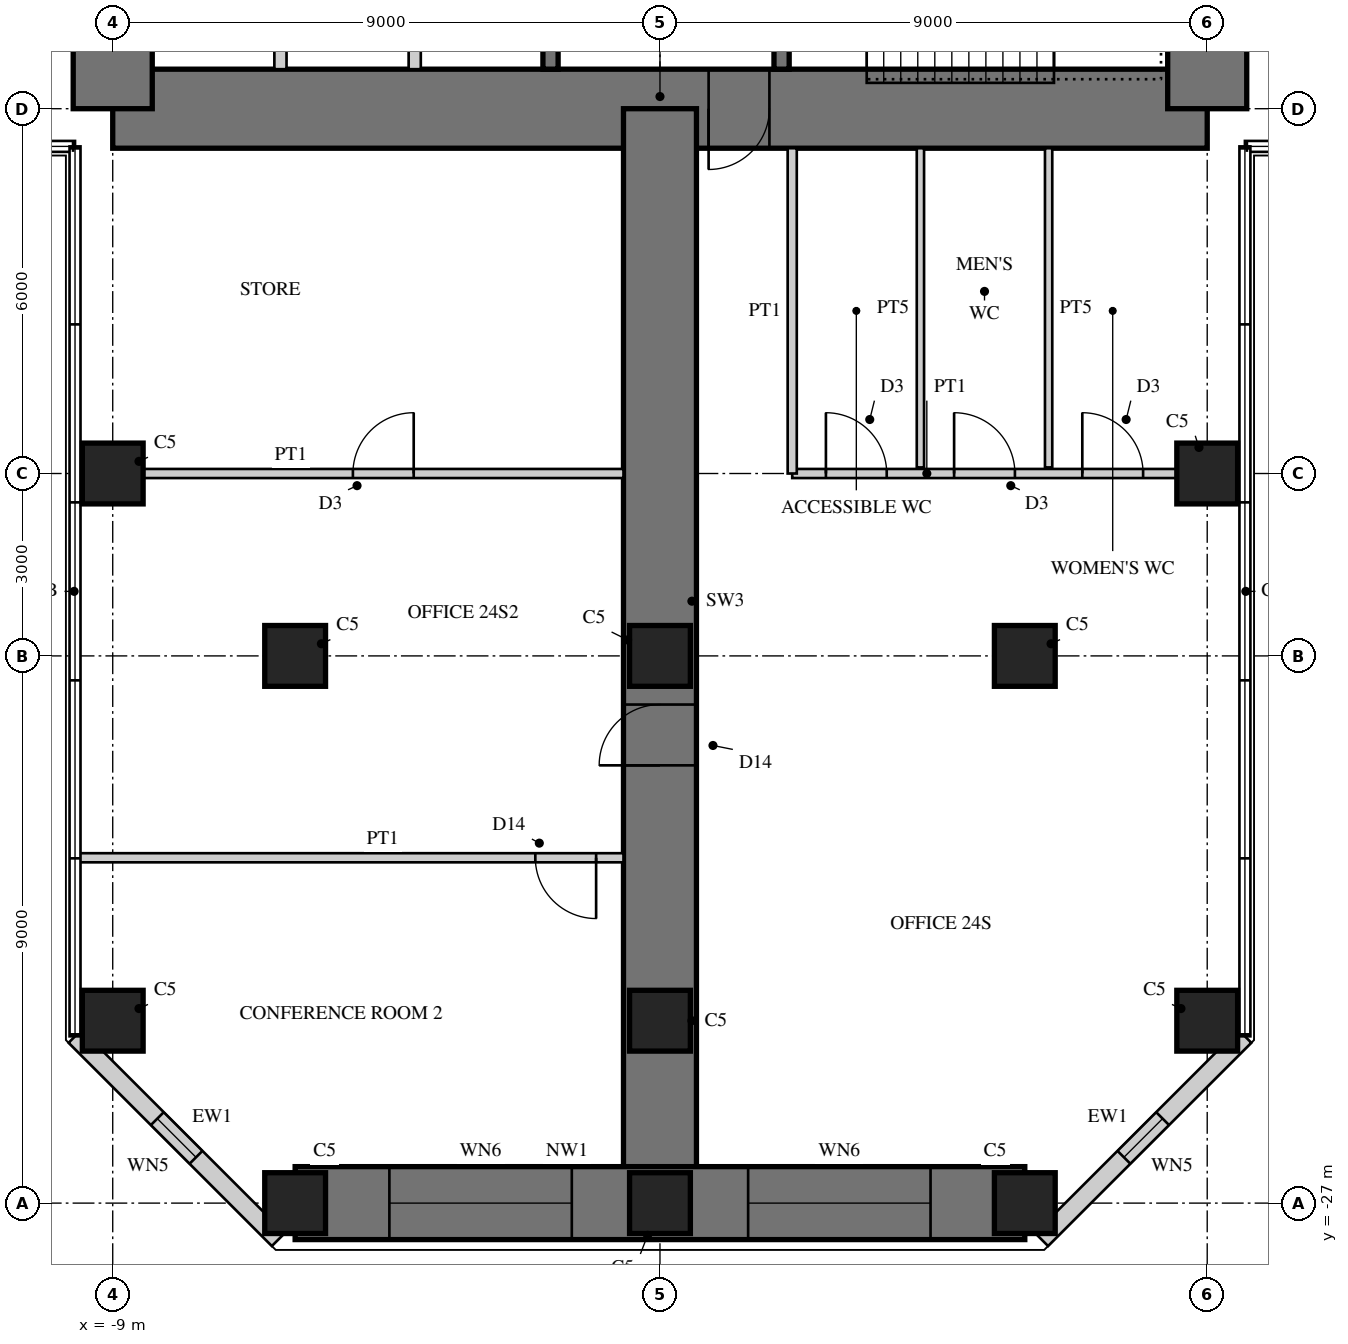
"""IFC4 building model, lengths in metres.
Left out: names, types, materials, properties, quantities, classifications, styles, units other than length and angle.
Written with IfcOpenShell. Run it as: python <this file> out.ifc"""

import sys

from ifc_helpers import new_model, si_unit, direction, frame, frame_2d, origin, origin_2d, place, context, subcontext, project, spatial, rectangle, hollow_rectangle, extrude, element, fill, save


model = new_model("IFC4")
c1 = context("Model", 3, precision=1e-05, world=origin(), true_north=direction((0.0, 1.0)))
c2 = subcontext(c1, "Body", "Model", "MODEL_VIEW")
j1 = project(units=[si_unit("LENGTHUNIT", "METRE"), si_unit("PLANEANGLEUNIT", "RADIAN")], contexts=[c1])
p1 = place(None, origin())
s1 = spatial("IfcSite", under=j1, at=p1, CompositionType="ELEMENT")
p2 = place(p1, origin())
s2 = spatial("IfcBuilding", under=s1, at=p2, CompositionType="ELEMENT")
p3 = place(p2, frame((0.0, 0.0, 100.5)))
s3 = spatial("IfcBuildingStorey", under=s2, at=p3, CompositionType="ELEMENT", Elevation=100.5)
p4 = place(p3, frame((-9.0, -9.0, 0.0), z_axis=(0.0, 0.0, 1.0), x_axis=(1.0, 0.0, 0.0)))
e1 = element("IfcWall", 1, at=p4, inside=s3, PredefinedType="SHEAR", context=c2, shape_type="SweptSolid", body=[
    extrude(rectangle(XDim=18.0, YDim=1.3, at=frame_2d((9.0, 0.0))), origin(), (0.0, 0.0, 1.0), 4.0),
])
p5 = place(p4, frame((9.8, 0.0, 0.0)))
e2 = element("IfcOpeningElement", 2, at=p5, cuts=e1, PredefinedType="OPENING", context=c2, shape_type="SweptSolid", body=[
    extrude(rectangle(XDim=1.0, YDim=2.4, at=frame_2d((0.5, 1.2))), frame((0.0, 0.66, 0.0), z_axis=(0.0, -1.0, 0.0), x_axis=(1.0, 0.0, 0.0)), (0.0, 0.0, 1.0), 1.32),
])
p6 = place(p3, frame((9.0, -9.0, 0.0), z_axis=(0.0, 0.0, 1.0), x_axis=(0.0, 1.0, 0.0)))
e3 = element("IfcWall", 3, at=p6, inside=s3, PredefinedType="SHEAR", context=c2, shape_type="SweptSolid", body=[
    extrude(rectangle(XDim=18.0, YDim=1.3, at=frame_2d((9.0, 0.0))), origin(), (0.0, 0.0, 1.0), 4.0),
])
p7 = place(p6, frame((9.8, 0.0, 0.0)))
e4 = element("IfcOpeningElement", 4, at=p7, cuts=e3, PredefinedType="OPENING", context=c2, shape_type="SweptSolid", body=[
    extrude(rectangle(XDim=1.0, YDim=2.4, at=frame_2d((0.5, 1.2))), frame((0.0, 0.66, 0.0), z_axis=(0.0, -1.0, 0.0), x_axis=(1.0, 0.0, 0.0)), (0.0, 0.0, 1.0), 1.32),
])
p8 = place(p3, frame((-9.0, 9.0, 0.0), z_axis=(0.0, 0.0, 1.0), x_axis=(0.0, -1.0, 0.0)))
e5 = element("IfcWall", 5, at=p8, inside=s3, PredefinedType="SHEAR", context=c2, shape_type="SweptSolid", body=[
    extrude(rectangle(XDim=18.0, YDim=1.3, at=frame_2d((9.0, 0.0))), origin(), (0.0, 0.0, 1.0), 4.0),
])
p9 = place(p8, frame((9.8, 0.0, 0.0)))
e6 = element("IfcOpeningElement", 6, at=p9, cuts=e5, PredefinedType="OPENING", context=c2, shape_type="SweptSolid", body=[
    extrude(rectangle(XDim=1.0, YDim=2.4, at=frame_2d((0.5, 1.2))), frame((0.0, 0.66, 0.0), z_axis=(0.0, -1.0, 0.0), x_axis=(1.0, 0.0, 0.0)), (0.0, 0.0, 1.0), 1.32),
])
p10 = place(p3, frame((-1.8, -1.875, 0.0), z_axis=(0.0, 0.0, 1.0), x_axis=(0.0, -1.0, 0.0)))
e7 = element("IfcWall", 7, at=p10, inside=s3, PredefinedType="SHEAR", context=c2, shape_type="SweptSolid", body=[
    extrude(rectangle(XDim=6.475, YDim=0.25, at=frame_2d((3.238, 0.0))), origin(), (0.0, 0.0, 1.0), 4.0),
])
p11 = place(p10, frame((1.875, 0.0, 0.0)))
e8 = element("IfcOpeningElement", 8, at=p11, cuts=e7, PredefinedType="OPENING", context=c2, shape_type="SweptSolid", body=[
    extrude(rectangle(XDim=1.6, YDim=2.4, at=frame_2d((0.8, 1.2))), frame((0.0, 0.135, 0.0), z_axis=(0.0, -1.0, 0.0), x_axis=(1.0, 0.0, 0.0)), (0.0, 0.0, 1.0), 0.27),
])
for number, where, z_axis, x_axis in (
    (9, (-4.033, -5.975, 0.0), (0.0, 0.0, 1.0), (0.0, -1.0, 0.0)),
    (10, (-6.242, -5.975, 0.0), (0.0, 0.0, 1.0), (0.0, -1.0, 0.0)),
):
    element("IfcWall", number, at=place(p3, frame(where, z_axis=z_axis, x_axis=x_axis)), inside=s3, PredefinedType="PARTITIONING", context=c2, shape_type="SweptSolid", body=[
        extrude(rectangle(XDim=2.375, YDim=0.2, at=frame_2d((1.188, 0.0))), origin(), (0.0, 0.0, 1.0), 4.0),
    ])
p12 = place(p3, frame((2.0, -1.675, 0.0), z_axis=(0.0, 0.0, 1.0), x_axis=(0.0, -1.0, 0.0)))
e11 = element("IfcWall", 11, at=p12, inside=s3, PredefinedType="SHEAR", context=c2, shape_type="SweptSolid", body=[
    extrude(rectangle(XDim=6.675, YDim=0.25, at=frame_2d((3.337, 0.0))), origin(), (0.0, 0.0, 1.0), 4.0),
])
p13 = place(p12, frame((0.725, 0.0, 0.0)))
e12 = element("IfcOpeningElement", 12, at=p13, cuts=e11, PredefinedType="OPENING", context=c2, shape_type="SweptSolid", body=[
    extrude(rectangle(XDim=1.0, YDim=2.1, at=frame_2d((0.5, 1.05))), frame((0.0, 0.135, 0.0), z_axis=(0.0, -1.0, 0.0), x_axis=(1.0, 0.0, 0.0)), (0.0, 0.0, 1.0), 0.27),
])
p14 = place(p3, frame((0.0, -9.0, 0.0), z_axis=(0.0, 0.0, 1.0), x_axis=(0.0, -1.0, 0.0)))
e13 = element("IfcWall", 13, at=p14, inside=s3, PredefinedType="SHEAR", context=c2, shape_type="SweptSolid", body=[
    extrude(rectangle(XDim=18.0, YDim=1.2, at=frame_2d((9.0, 0.0))), origin(), (0.0, 0.0, 1.0), 4.0),
])
p15 = place(p14, frame((9.8, 0.0, 0.0)))
e14 = element("IfcOpeningElement", 14, at=p15, cuts=e13, PredefinedType="OPENING", context=c2, shape_type="SweptSolid", body=[
    extrude(rectangle(XDim=1.0, YDim=2.2, at=frame_2d((0.5, 1.1))), frame((0.0, 0.61, 0.0), z_axis=(0.0, -1.0, 0.0), x_axis=(1.0, 0.0, 0.0)), (0.0, 0.0, 1.0), 1.22),
])
p16 = place(p3, frame((-6.0, -27.0, 0.0), z_axis=(0.0, 0.0, 1.0), x_axis=(1.0, 0.0, 0.0)))
e15 = element("IfcWall", 15, at=p16, inside=s3, PredefinedType="SHEAR", context=c2, shape_type="SweptSolid", body=[
    extrude(rectangle(XDim=12.0, YDim=1.2, at=frame_2d((6.0, 0.0))), origin(), (0.0, 0.0, 1.0), 4.0),
])
p17 = place(p16, frame((1.55, 0.0, 0.6)))
e16 = element("IfcOpeningElement", 16, at=p17, cuts=e15, PredefinedType="OPENING", context=c2, shape_type="SweptSolid", body=[
    extrude(rectangle(XDim=3.0, YDim=2.4, at=frame_2d((1.5, 1.2))), frame((0.0, 0.61, 0.0), z_axis=(0.0, -1.0, 0.0), x_axis=(1.0, 0.0, 0.0)), (0.0, 0.0, 1.0), 1.22),
])
p18 = place(p16, frame((7.45, 0.0, 0.6)))
e17 = element("IfcOpeningElement", 17, at=p18, cuts=e15, PredefinedType="OPENING", context=c2, shape_type="SweptSolid", body=[
    extrude(rectangle(XDim=3.0, YDim=2.4, at=frame_2d((1.5, 1.2))), frame((0.0, 0.61, 0.0), z_axis=(0.0, -1.0, 0.0), x_axis=(1.0, 0.0, 0.0)), (0.0, 0.0, 1.0), 1.22),
])
for number, where, z_axis, x_axis in (
    (18, (-9.0, -15.0, 0.0), (0.0, 0.0, 1.0), (1.0, 0.0, 0.0)),
    (19, (-9.0, -24.0, 0.0), (0.0, 0.0, 1.0), (1.0, 0.0, 0.0)),
    (20, (9.0, -15.0, 0.0), (0.0, 0.0, 1.0), (1.0, 0.0, 0.0)),
    (21, (9.0, -24.0, 0.0), (0.0, 0.0, 1.0), (1.0, 0.0, 0.0)),
    (22, (-6.0, -27.0, 0.0), (0.0, 0.0, 1.0), (1.0, 0.0, 0.0)),
    (23, (0.0, -27.0, 0.0), (0.0, 0.0, 1.0), (1.0, 0.0, 0.0)),
    (24, (6.0, -27.0, 0.0), (0.0, 0.0, 1.0), (1.0, 0.0, 0.0)),
    (25, (-6.0, -18.0, 0.0), (0.0, 0.0, 1.0), (1.0, 0.0, 0.0)),
    (26, (0.0, -18.0, 0.0), (0.0, 0.0, 1.0), (1.0, 0.0, 0.0)),
    (27, (6.0, -18.0, 0.0), (0.0, 0.0, 1.0), (1.0, 0.0, 0.0)),
    (28, (0.0, -24.0, 0.0), (0.0, 0.0, 1.0), (1.0, 0.0, 0.0)),
):
    element("IfcColumn", number, at=place(p3, frame(where, z_axis=z_axis, x_axis=x_axis)), inside=s3, PredefinedType="COLUMN", context=c2, shape_type="SweptSolid", body=[
        extrude(rectangle(XDim=1.0, YDim=1.0, at=origin_2d()), origin(), (0.0, 0.0, 1.0), 4.0),
    ])
p19 = place(p3, frame((-9.62, -24.257, 0.0), z_axis=(0.0, 0.0, 1.0), x_axis=(0.707106781187, -0.707106781187, 0.0)))
e29 = element("IfcWall", 29, at=p19, inside=s3, PredefinedType="SOLIDWALL", context=c2, shape_type="SweptSolid", body=[
    extrude(rectangle(XDim=4.728, YDim=0.3, at=frame_2d((2.364, 0.0))), origin(), (0.0, 0.0, 1.0), 3.8),
])
p20 = place(p19, frame((1.914, 0.0, 0.3)))
e30 = element("IfcOpeningElement", 30, at=p20, cuts=e29, PredefinedType="OPENING", context=c2, shape_type="SweptSolid", body=[
    extrude(rectangle(XDim=0.9, YDim=2.4, at=frame_2d((0.45, 1.2))), frame((0.0, 0.16, 0.0), z_axis=(0.0, -1.0, 0.0), x_axis=(1.0, 0.0, 0.0)), (0.0, 0.0, 1.0), 0.32),
])
p21 = place(p3, frame((6.277, -27.6, 0.0), z_axis=(0.0, 0.0, 1.0), x_axis=(0.707106781187, 0.707106781187, 0.0)))
e31 = element("IfcWall", 31, at=p21, inside=s3, PredefinedType="SOLIDWALL", context=c2, shape_type="SweptSolid", body=[
    extrude(rectangle(XDim=4.728, YDim=0.3, at=frame_2d((2.364, 0.0))), origin(), (0.0, 0.0, 1.0), 3.8),
])
p22 = place(p21, frame((1.914, 0.0, 0.3)))
e32 = element("IfcOpeningElement", 32, at=p22, cuts=e31, PredefinedType="OPENING", context=c2, shape_type="SweptSolid", body=[
    extrude(rectangle(XDim=0.9, YDim=2.4, at=frame_2d((0.45, 1.2))), frame((0.0, 0.16, 0.0), z_axis=(0.0, -1.0, 0.0), x_axis=(1.0, 0.0, 0.0)), (0.0, 0.0, 1.0), 0.32),
])
p23 = place(p3, frame((2.175, -15.0, 0.0), z_axis=(0.0, 0.0, 1.0), x_axis=(1.0, 0.0, 0.0)))
e33 = element("IfcWall", 33, at=p23, inside=s3, PredefinedType="PARTITIONING", context=c2, shape_type="SweptSolid", body=[
    extrude(rectangle(XDim=6.325, YDim=0.15, at=frame_2d((3.163, 0.0))), origin(), (0.0, 0.0, 1.0), 3.0),
])
p24 = place(p23, frame((0.554, 0.0, 0.0)))
e34 = element("IfcOpeningElement", 34, at=p24, cuts=e33, PredefinedType="OPENING", context=c2, shape_type="SweptSolid", body=[
    extrude(rectangle(XDim=1.0, YDim=2.1, at=frame_2d((0.5, 1.05))), frame((0.0, 0.085, 0.0), z_axis=(0.0, -1.0, 0.0), x_axis=(1.0, 0.0, 0.0)), (0.0, 0.0, 1.0), 0.17),
])
p25 = place(p23, frame((2.663, 0.0, 0.0)))
e35 = element("IfcOpeningElement", 35, at=p25, cuts=e33, PredefinedType="OPENING", context=c2, shape_type="SweptSolid", body=[
    extrude(rectangle(XDim=1.0, YDim=2.1, at=frame_2d((0.5, 1.05))), frame((0.0, 0.085, 0.0), z_axis=(0.0, -1.0, 0.0), x_axis=(1.0, 0.0, 0.0)), (0.0, 0.0, 1.0), 0.17),
])
p26 = place(p23, frame((4.771, 0.0, 0.0)))
e36 = element("IfcOpeningElement", 36, at=p26, cuts=e33, PredefinedType="OPENING", context=c2, shape_type="SweptSolid", body=[
    extrude(rectangle(XDim=1.0, YDim=2.1, at=frame_2d((0.5, 1.05))), frame((0.0, 0.085, 0.0), z_axis=(0.0, -1.0, 0.0), x_axis=(1.0, 0.0, 0.0)), (0.0, 0.0, 1.0), 0.17),
])
p27 = place(p3, frame((2.175, -9.65, 0.0), z_axis=(0.0, 0.0, 1.0), x_axis=(0.0, -1.0, 0.0)))
e37 = element("IfcWall", 37, at=p27, inside=s3, PredefinedType="PARTITIONING", context=c2, shape_type="SweptSolid", body=[
    extrude(rectangle(XDim=5.35, YDim=0.15, at=frame_2d((2.675, 0.0))), origin(), (0.0, 0.0, 1.0), 3.8),
])
for number, where, z_axis, x_axis in (
    (38, (4.283, -9.65, 0.0), (0.0, 0.0, 1.0), (0.0, -1.0, 0.0)),
    (39, (6.392, -9.65, 0.0), (0.0, 0.0, 1.0), (0.0, -1.0, 0.0)),
):
    element("IfcWall", number, at=place(p3, frame(where, z_axis=z_axis, x_axis=x_axis)), inside=s3, PredefinedType="PLUMBINGWALL", context=c2, shape_type="SweptSolid", body=[
        extrude(rectangle(XDim=5.25, YDim=0.12, at=frame_2d((2.625, 0.0))), origin(), (0.0, 0.0, 1.0), 3.8),
    ])
p28 = place(p3, frame((-8.5, -15.0, 0.0), z_axis=(0.0, 0.0, 1.0), x_axis=(1.0, 0.0, 0.0)))
e40 = element("IfcWall", 40, at=p28, inside=s3, PredefinedType="PARTITIONING", context=c2, shape_type="SweptSolid", body=[
    extrude(rectangle(XDim=7.9, YDim=0.15, at=frame_2d((3.95, 0.0))), origin(), (0.0, 0.0, 1.0), 3.0),
])
p29 = place(p28, frame((3.45, 0.0, 0.0)))
e41 = element("IfcOpeningElement", 41, at=p29, cuts=e40, PredefinedType="OPENING", context=c2, shape_type="SweptSolid", body=[
    extrude(rectangle(XDim=1.0, YDim=2.1, at=frame_2d((0.5, 1.05))), frame((0.0, 0.085, 0.0), z_axis=(0.0, -1.0, 0.0), x_axis=(1.0, 0.0, 0.0)), (0.0, 0.0, 1.0), 0.17),
])
p30 = place(p3, frame((-9.58, -21.32, 0.0), z_axis=(0.0, 0.0, 1.0), x_axis=(1.0, 0.0, 0.0)))
e42 = element("IfcWall", 42, at=p30, inside=s3, PredefinedType="PARTITIONING", context=c2, shape_type="SweptSolid", body=[
    extrude(rectangle(XDim=8.98, YDim=0.15, at=frame_2d((4.49, 0.0))), origin(), (0.0, 0.0, 1.0), 3.8),
])
p31 = place(p30, frame((7.53, 0.0, 0.0)))
e43 = element("IfcOpeningElement", 43, at=p31, cuts=e42, PredefinedType="OPENING", context=c2, shape_type="SweptSolid", body=[
    extrude(rectangle(XDim=1.0, YDim=2.2, at=frame_2d((0.5, 1.1))), frame((0.0, 0.085, 0.0), z_axis=(0.0, -1.0, 0.0), x_axis=(1.0, 0.0, 0.0)), (0.0, 0.0, 1.0), 0.17),
])
p32 = place(p20, origin())
e44 = element("IfcWindow", 44, at=p32, inside=s3, PartitioningType="SINGLE_PANEL", PredefinedType="WINDOW", context=c2, shape_type="SweptSolid", body=[
    extrude(hollow_rectangle(XDim=0.9, YDim=2.4, WallThickness=0.06, at=frame_2d((0.45, 1.2))), frame((0.0, 0.03, 0.0), z_axis=(0.0, -1.0, 0.0), x_axis=(1.0, 0.0, 0.0)), (0.0, 0.0, 1.0), 0.06),
    extrude(rectangle(XDim=0.779, YDim=2.279, at=frame_2d((0.45, 1.2))), frame((0.0, 0.03, 0.0), z_axis=(0.0, -1.0, 0.0), x_axis=(1.0, 0.0, 0.0)), (0.0, 0.0, 1.0), 0.06),
])
fill(e30, e44)
p33 = place(p17, origin())
e45 = element("IfcWindow", 45, at=p33, inside=s3, PartitioningType="SINGLE_PANEL", PredefinedType="WINDOW", context=c2, shape_type="SweptSolid", body=[
    extrude(hollow_rectangle(XDim=3.0, YDim=2.4, WallThickness=0.06, at=frame_2d((1.5, 1.2))), frame((0.0, 0.03, 0.0), z_axis=(0.0, -1.0, 0.0), x_axis=(1.0, 0.0, 0.0)), (0.0, 0.0, 1.0), 0.06),
    extrude(rectangle(XDim=2.879, YDim=2.279, at=frame_2d((1.5, 1.2))), frame((0.0, 0.03, 0.0), z_axis=(0.0, -1.0, 0.0), x_axis=(1.0, 0.0, 0.0)), (0.0, 0.0, 1.0), 0.06),
])
fill(e16, e45)
p34 = place(p18, origin())
e46 = element("IfcWindow", 46, at=p34, inside=s3, PartitioningType="SINGLE_PANEL", PredefinedType="WINDOW", context=c2, shape_type="SweptSolid", body=[
    extrude(hollow_rectangle(XDim=3.0, YDim=2.4, WallThickness=0.06, at=frame_2d((1.5, 1.2))), frame((0.0, 0.03, 0.0), z_axis=(0.0, -1.0, 0.0), x_axis=(1.0, 0.0, 0.0)), (0.0, 0.0, 1.0), 0.06),
    extrude(rectangle(XDim=2.879, YDim=2.279, at=frame_2d((1.5, 1.2))), frame((0.0, 0.03, 0.0), z_axis=(0.0, -1.0, 0.0), x_axis=(1.0, 0.0, 0.0)), (0.0, 0.0, 1.0), 0.06),
])
fill(e17, e46)
p35 = place(p22, origin())
e47 = element("IfcWindow", 47, at=p35, inside=s3, PartitioningType="SINGLE_PANEL", PredefinedType="WINDOW", context=c2, shape_type="SweptSolid", body=[
    extrude(hollow_rectangle(XDim=0.9, YDim=2.4, WallThickness=0.06, at=frame_2d((0.45, 1.2))), frame((0.0, 0.03, 0.0), z_axis=(0.0, -1.0, 0.0), x_axis=(1.0, 0.0, 0.0)), (0.0, 0.0, 1.0), 0.06),
    extrude(rectangle(XDim=0.779, YDim=2.279, at=frame_2d((0.45, 1.2))), frame((0.0, 0.03, 0.0), z_axis=(0.0, -1.0, 0.0), x_axis=(1.0, 0.0, 0.0)), (0.0, 0.0, 1.0), 0.06),
])
fill(e32, e47)
p36 = place(p24, origin())
e48 = element("IfcDoor", 48, at=p36, inside=s3, OperationType="SINGLE_SWING_LEFT", PredefinedType="DOOR", context=c2, shape_type="SweptSolid", body=[
    extrude(rectangle(XDim=1.0, YDim=2.1, at=frame_2d((0.5, 1.05))), frame((0.0, 0.025, 0.0), z_axis=(0.0, -1.0, 0.0), x_axis=(1.0, 0.0, 0.0)), (0.0, 0.0, 1.0), 0.05),
])
fill(e34, e48)
p37 = place(p25, origin())
e49 = element("IfcDoor", 49, at=p37, inside=s3, OperationType="SINGLE_SWING_LEFT", PredefinedType="DOOR", context=c2, shape_type="SweptSolid", body=[
    extrude(rectangle(XDim=1.0, YDim=2.1, at=frame_2d((0.5, 1.05))), frame((0.0, 0.025, 0.0), z_axis=(0.0, -1.0, 0.0), x_axis=(1.0, 0.0, 0.0)), (0.0, 0.0, 1.0), 0.05),
])
fill(e35, e49)
p38 = place(p26, origin())
e50 = element("IfcDoor", 50, at=p38, inside=s3, OperationType="SINGLE_SWING_LEFT", PredefinedType="DOOR", context=c2, shape_type="SweptSolid", body=[
    extrude(rectangle(XDim=1.0, YDim=2.1, at=frame_2d((0.5, 1.05))), frame((0.0, 0.025, 0.0), z_axis=(0.0, -1.0, 0.0), x_axis=(1.0, 0.0, 0.0)), (0.0, 0.0, 1.0), 0.05),
])
fill(e36, e50)
p39 = place(p29, origin())
e51 = element("IfcDoor", 51, at=p39, inside=s3, OperationType="SINGLE_SWING_RIGHT", PredefinedType="DOOR", context=c2, shape_type="SweptSolid", body=[
    extrude(rectangle(XDim=1.0, YDim=2.1, at=frame_2d((0.5, 1.05))), frame((0.0, 0.025, 0.0), z_axis=(0.0, -1.0, 0.0), x_axis=(1.0, 0.0, 0.0)), (0.0, 0.0, 1.0), 0.05),
])
fill(e41, e51)
p40 = place(p31, frame((1.0, 0.0, 0.0), z_axis=(0.0, 0.0, 1.0), x_axis=(-1.0, 0.0, 0.0)))
e52 = element("IfcDoor", 52, at=p40, inside=s3, OperationType="SINGLE_SWING_LEFT", PredefinedType="DOOR", context=c2, shape_type="SweptSolid", body=[
    extrude(rectangle(XDim=1.0, YDim=2.2, at=frame_2d((0.5, 1.1))), frame((0.0, 0.025, 0.0), z_axis=(0.0, -1.0, 0.0), x_axis=(1.0, 0.0, 0.0)), (0.0, 0.0, 1.0), 0.05),
])
fill(e43, e52)
p41 = place(p15, frame((1.0, 0.0, 0.0), z_axis=(0.0, 0.0, 1.0), x_axis=(-1.0, 0.0, 0.0)))
e53 = element("IfcDoor", 53, at=p41, inside=s3, OperationType="SINGLE_SWING_LEFT", PredefinedType="DOOR", context=c2, shape_type="SweptSolid", body=[
    extrude(rectangle(XDim=1.0, YDim=2.2, at=frame_2d((0.5, 1.1))), frame((0.0, 0.025, 0.0), z_axis=(0.0, -1.0, 0.0), x_axis=(1.0, 0.0, 0.0)), (0.0, 0.0, 1.0), 0.05),
])
fill(e14, e53)
p42 = place(p5, frame((1.0, 0.0, 0.0), z_axis=(0.0, 0.0, 1.0), x_axis=(-1.0, 0.0, 0.0)))
e54 = element("IfcDoor", 54, at=p42, inside=s3, OperationType="SINGLE_SWING_RIGHT", PredefinedType="DOOR", context=c2, shape_type="SweptSolid", body=[
    extrude(rectangle(XDim=1.0, YDim=2.4, at=frame_2d((0.5, 1.2))), frame((0.0, -0.005, 0.0), z_axis=(0.0, -1.0, 0.0), x_axis=(1.0, 0.0, 0.0)), (0.0, 0.0, 1.0), 0.05),
])
fill(e2, e54)
save(model, sys.argv[1])
